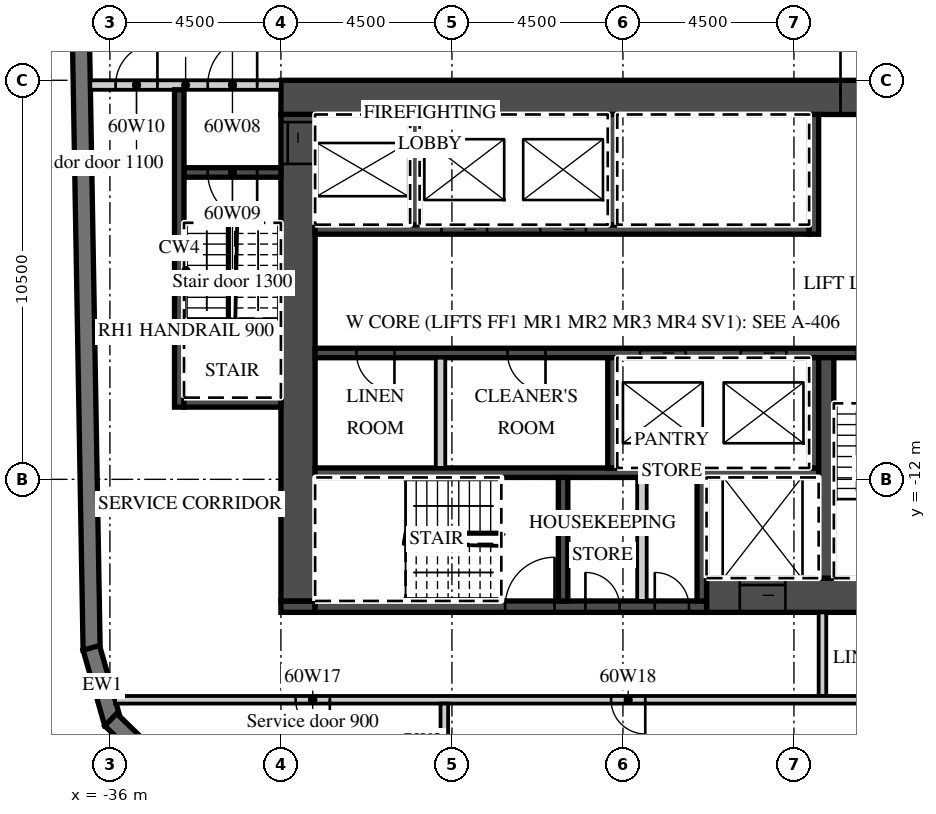
"""IFC4 building model, lengths in metres.
Left out: names, types, materials, properties, quantities, classifications, styles, units other than length and angle.
Written with IfcOpenShell. Run it as: python <this file> out.ifc"""

import sys

from ifc_helpers import new_model, si_unit, direction, frame, frame_2d, origin, place, context, subcontext, project, spatial, polyline, rectangle, outline, extrude, element, fill, save


model = new_model("IFC4")
c1 = context("Model", 3, precision=1e-05, world=origin(), true_north=direction((0.0, 1.0)))
c2 = subcontext(c1, "Body", "Model", "MODEL_VIEW")
j1 = project(units=[si_unit("LENGTHUNIT", "METRE"), si_unit("PLANEANGLEUNIT", "RADIAN")], contexts=[c1])
p1 = place(None, origin())
s1 = spatial("IfcSite", under=j1, at=p1, CompositionType="ELEMENT")
p2 = place(p1, origin())
s2 = spatial("IfcBuilding", under=s1, at=p2, CompositionType="ELEMENT")
p3 = place(p2, frame((0.0, 0.0, 244.1)))
s3 = spatial("IfcBuildingStorey", under=s2, at=p3, CompositionType="ELEMENT", Elevation=244.1)
p4 = place(p3, frame((-37.057, 16.503, 0.0), z_axis=(0.0, 0.0, 1.0), x_axis=(0.017452279857, -0.999847697366, 0.0)))
e1 = element("IfcWall", 1, at=p4, inside=s3, PredefinedType="SOLIDWALL", context=c2, shape_type="SweptSolid", body=[
    extrude(rectangle(XDim=33.0, YDim=0.45, at=frame_2d((16.5, 0.0))), origin(), (0.0, 0.0, 1.0), 3.02),
])
p5 = place(p3, frame((-36.49, -16.434, 0.0), z_axis=(0.0, 0.0, 1.0), x_axis=(0.275577603096, -0.961278827745, 0.0)))
e2 = element("IfcWall", 2, at=p5, inside=s3, PredefinedType="SOLIDWALL", context=c2, shape_type="SweptSolid", body=[
    extrude(outline(polyline([(0.0, -0.225), (2.071, -0.225), (1.95, 0.225), (0.121, 0.225), (0.0, -0.225)])), origin(), (0.0, 0.0, 1.0), 3.02),
])
p6 = place(p3, frame((-35.979, -18.324, 0.0), z_axis=(0.0, 0.0, 1.0), x_axis=(0.719320193998, -0.694678672846, 0.0)))
e3 = element("IfcWall", 3, at=p6, inside=s3, PredefinedType="SOLIDWALL", context=c2, shape_type="SweptSolid", body=[
    extrude(outline(polyline([(0.0, -0.225), (2.071, -0.225), (1.95, 0.225), (0.121, 0.225), (0.0, -0.225)])), origin(), (0.0, 0.0, 1.0), 3.02),
])
p7 = place(p3, frame((-31.5, -1.95, 0.0), z_axis=(0.0, 0.0, 1.0), x_axis=(1.0, 0.0, 0.0)))
e4 = element("IfcWall", 4, at=p7, inside=s3, PredefinedType="SHEAR", context=c2, shape_type="SweptSolid", body=[
    extrude(rectangle(XDim=18.0, YDim=0.9, at=frame_2d((9.0, 0.0))), origin(), (0.0, 0.0, 1.0), 3.02),
])
p8 = place(p7, frame((14.725, 0.0, 0.0)))
e5 = element("IfcOpeningElement", 5, at=p8, cuts=e4, PredefinedType="OPENING", context=c2, shape_type="SweptSolid", body=[
    extrude(rectangle(XDim=1.8, YDim=2.1, at=frame_2d((0.9, 1.05))), frame((0.0, 0.46, 0.0), z_axis=(0.0, -1.0, 0.0), x_axis=(1.0, 0.0, 0.0)), (0.0, 0.0, 1.0), 0.92),
])
p9 = place(p3, frame((-20.3, -15.05, 0.0), z_axis=(0.0, 0.0, 1.0), x_axis=(1.0, 0.0, 0.0)))
e6 = element("IfcWall", 6, at=p9, inside=s3, PredefinedType="SHEAR", context=c2, shape_type="SweptSolid", body=[
    extrude(rectangle(XDim=6.8, YDim=0.9, at=frame_2d((3.4, 0.0))), origin(), (0.0, 0.0, 1.0), 3.02),
])
p10 = place(p9, frame((0.875, 0.0, 0.0)))
e7 = element("IfcOpeningElement", 7, at=p10, cuts=e6, PredefinedType="OPENING", context=c2, shape_type="SweptSolid", body=[
    extrude(rectangle(XDim=1.2, YDim=2.1, at=frame_2d((0.6, 1.05))), frame((0.0, 0.46, 0.0), z_axis=(0.0, -1.0, 0.0), x_axis=(1.0, 0.0, 0.0)), (0.0, 0.0, 1.0), 0.92),
])
p11 = place(p3, frame((-31.5, -15.35, 0.0), z_axis=(0.0, 0.0, 1.0), x_axis=(1.0, 0.0, 0.0)))
e8 = element("IfcWall", 8, at=p11, inside=s3, PredefinedType="SHEAR", context=c2, shape_type="SweptSolid", body=[
    extrude(rectangle(XDim=0.9, YDim=0.3, at=frame_2d((0.45, 0.0))), origin(), (0.0, 0.0, 1.0), 3.02),
])
p12 = place(p3, frame((-30.6, -15.35, 0.0), z_axis=(0.0, 0.0, 1.0), x_axis=(1.0, 0.0, 0.0)))
e9 = element("IfcWall", 9, at=p12, inside=s3, PredefinedType="SHEAR", context=c2, shape_type="SweptSolid", body=[
    extrude(rectangle(XDim=10.3, YDim=0.3, at=frame_2d((5.15, 0.0))), origin(), (0.0, 0.0, 1.0), 3.02),
])
p13 = place(p12, frame((5.0, 0.0, 0.0)))
e10 = element("IfcOpeningElement", 10, at=p13, cuts=e9, PredefinedType="OPENING", context=c2, shape_type="SweptSolid", body=[
    extrude(rectangle(XDim=1.3, YDim=2.1, at=frame_2d((0.65, 1.05))), frame((0.0, 0.16, 0.0), z_axis=(0.0, -1.0, 0.0), x_axis=(1.0, 0.0, 0.0)), (0.0, 0.0, 1.0), 0.32),
])
p14 = place(p12, frame((7.113, 0.0, 0.0)))
e11 = element("IfcOpeningElement", 11, at=p14, cuts=e9, PredefinedType="OPENING", context=c2, shape_type="SweptSolid", body=[
    extrude(rectangle(XDim=0.9, YDim=2.1, at=frame_2d((0.45, 1.05))), frame((0.0, 0.16, 0.0), z_axis=(0.0, -1.0, 0.0), x_axis=(1.0, 0.0, 0.0)), (0.0, 0.0, 1.0), 0.32),
])
p15 = place(p12, frame((8.938, 0.0, 0.0)))
e12 = element("IfcOpeningElement", 12, at=p15, cuts=e9, PredefinedType="OPENING", context=c2, shape_type="SweptSolid", body=[
    extrude(rectangle(XDim=0.9, YDim=2.1, at=frame_2d((0.45, 1.05))), frame((0.0, 0.16, 0.0), z_axis=(0.0, -1.0, 0.0), x_axis=(1.0, 0.0, 0.0)), (0.0, 0.0, 1.0), 0.32),
])
p16 = place(p3, frame((-31.05, -15.2, 0.0), z_axis=(0.0, 0.0, 1.0), x_axis=(0.0, 1.0, 0.0)))
e13 = element("IfcWall", 13, at=p16, inside=s3, PredefinedType="SHEAR", context=c2, shape_type="SweptSolid", body=[
    extrude(rectangle(XDim=12.8, YDim=0.9, at=frame_2d((6.4, 0.0))), origin(), (0.0, 0.0, 1.0), 3.02),
])
p17 = place(p16, frame((11.5, 0.0, 0.0)))
e14 = element("IfcOpeningElement", 14, at=p17, cuts=e13, PredefinedType="OPENING", context=c2, shape_type="SweptSolid", body=[
    extrude(rectangle(XDim=1.1, YDim=2.1, at=frame_2d((0.55, 1.05))), frame((0.0, 0.46, 0.0), z_axis=(0.0, -1.0, 0.0), x_axis=(1.0, 0.0, 0.0)), (0.0, 0.0, 1.0), 0.92),
])
p18 = place(p3, frame((-30.6, -5.425, 0.0), z_axis=(0.0, 0.0, 1.0), x_axis=(1.0, 0.0, 0.0)))
e15 = element("IfcWall", 15, at=p18, inside=s3, PredefinedType="SHEAR", context=c2, shape_type="SweptSolid", body=[
    extrude(rectangle(XDim=13.0, YDim=0.25, at=frame_2d((6.5, 0.0))), origin(), (0.0, 0.0, 1.0), 3.02),
])
p19 = place(p18, frame((3.325, 0.0, 0.0)))
e16 = element("IfcOpeningElement", 16, at=p19, cuts=e15, PredefinedType="OPENING", context=c2, shape_type="SweptSolid", body=[
    extrude(rectangle(XDim=1.2, YDim=2.1, at=frame_2d((0.6, 1.05))), frame((0.0, 0.135, 0.0), z_axis=(0.0, -1.0, 0.0), x_axis=(1.0, 0.0, 0.0)), (0.0, 0.0, 1.0), 0.27),
])
p20 = place(p18, frame((5.925, 0.0, 0.0)))
e17 = element("IfcOpeningElement", 17, at=p20, cuts=e15, PredefinedType="OPENING", context=c2, shape_type="SweptSolid", body=[
    extrude(rectangle(XDim=1.2, YDim=2.1, at=frame_2d((0.6, 1.05))), frame((0.0, 0.135, 0.0), z_axis=(0.0, -1.0, 0.0), x_axis=(1.0, 0.0, 0.0)), (0.0, 0.0, 1.0), 0.27),
])
p21 = place(p3, frame((-17.475, -5.55, 0.0), z_axis=(0.0, 0.0, 1.0), x_axis=(0.0, 1.0, 0.0)))
e18 = element("IfcWall", 18, at=p21, inside=s3, PredefinedType="SHEAR", context=c2, shape_type="SweptSolid", body=[
    extrude(rectangle(XDim=3.15, YDim=0.25, at=frame_2d((1.575, 0.0))), origin(), (0.0, 0.0, 1.0), 3.02),
])
for number, where, z_axis, x_axis in (
    (19, (-27.975, -5.3, 0.0), (0.0, 0.0, 1.0), (0.0, 1.0, 0.0)),
    (20, (-22.775, -5.3, 0.0), (0.0, 0.0, 1.0), (0.0, 1.0, 0.0)),
):
    element("IfcWall", number, at=place(p3, frame(where, z_axis=z_axis, x_axis=x_axis)), inside=s3, PredefinedType="SHEAR", context=c2, shape_type="SweptSolid", body=[
        extrude(rectangle(XDim=2.9, YDim=0.25, at=frame_2d((1.45, 0.0))), origin(), (0.0, 0.0, 1.0), 3.02),
    ])
p22 = place(p3, frame((-30.6, -8.675, 0.0), z_axis=(0.0, 0.0, 1.0), x_axis=(1.0, 0.0, 0.0)))
e21 = element("IfcWall", 21, at=p22, inside=s3, PredefinedType="SHEAR", context=c2, shape_type="SweptSolid", body=[
    extrude(rectangle(XDim=16.2, YDim=0.25, at=frame_2d((8.1, 0.0))), origin(), (0.0, 0.0, 1.0), 3.02),
])
p23 = place(p22, frame((8.55, 0.0, 0.0)))
e22 = element("IfcOpeningElement", 22, at=p23, cuts=e21, PredefinedType="OPENING", context=c2, shape_type="SweptSolid", body=[
    extrude(rectangle(XDim=1.2, YDim=2.1, at=frame_2d((0.6, 1.05))), frame((0.0, 0.135, 0.0), z_axis=(0.0, -1.0, 0.0), x_axis=(1.0, 0.0, 0.0)), (0.0, 0.0, 1.0), 0.27),
])
p24 = place(p22, frame((11.2, 0.0, 0.0)))
e23 = element("IfcOpeningElement", 23, at=p24, cuts=e21, PredefinedType="OPENING", context=c2, shape_type="SweptSolid", body=[
    extrude(rectangle(XDim=1.2, YDim=2.1, at=frame_2d((0.6, 1.05))), frame((0.0, 0.135, 0.0), z_axis=(0.0, -1.0, 0.0), x_axis=(1.0, 0.0, 0.0)), (0.0, 0.0, 1.0), 0.27),
])
p25 = place(p22, frame((14.25, 0.0, 0.0)))
e24 = element("IfcOpeningElement", 24, at=p25, cuts=e21, PredefinedType="OPENING", context=c2, shape_type="SweptSolid", body=[
    extrude(rectangle(XDim=1.3, YDim=2.1, at=frame_2d((0.65, 1.05))), frame((0.0, 0.135, 0.0), z_axis=(0.0, -1.0, 0.0), x_axis=(1.0, 0.0, 0.0)), (0.0, 0.0, 1.0), 0.27),
])
p26 = place(p22, frame((1.087, 0.0, 0.0)))
e25 = element("IfcOpeningElement", 25, at=p26, cuts=e21, PredefinedType="OPENING", context=c2, shape_type="SweptSolid", body=[
    extrude(rectangle(XDim=1.0, YDim=2.1, at=frame_2d((0.5, 1.05))), frame((0.0, 0.135, 0.0), z_axis=(0.0, -1.0, 0.0), x_axis=(1.0, 0.0, 0.0)), (0.0, 0.0, 1.0), 0.27),
])
p27 = place(p22, frame((5.062, 0.0, 0.0)))
e26 = element("IfcOpeningElement", 26, at=p27, cuts=e21, PredefinedType="OPENING", context=c2, shape_type="SweptSolid", body=[
    extrude(rectangle(XDim=1.0, YDim=2.1, at=frame_2d((0.5, 1.05))), frame((0.0, 0.135, 0.0), z_axis=(0.0, -1.0, 0.0), x_axis=(1.0, 0.0, 0.0)), (0.0, 0.0, 1.0), 0.27),
])
p28 = place(p3, frame((-30.6, -11.825, 0.0), z_axis=(0.0, 0.0, 1.0), x_axis=(1.0, 0.0, 0.0)))
e27 = element("IfcWall", 27, at=p28, inside=s3, PredefinedType="SHEAR", context=c2, shape_type="SweptSolid", body=[
    extrude(rectangle(XDim=13.25, YDim=0.25, at=frame_2d((6.625, 0.0))), origin(), (0.0, 0.0, 1.0), 3.02),
])
for number, where, z_axis, x_axis in (
    (28, (-17.475, -11.7, 0.0), (0.0, 0.0, 1.0), (0.0, 1.0, 0.0)),
    (29, (-22.775, -11.7, 0.0), (0.0, 0.0, 1.0), (0.0, 1.0, 0.0)),
):
    element("IfcWall", number, at=place(p3, frame(where, z_axis=z_axis, x_axis=x_axis)), inside=s3, PredefinedType="SHEAR", context=c2, shape_type="SweptSolid", body=[
        extrude(rectangle(XDim=2.9, YDim=0.25, at=frame_2d((1.45, 0.0))), origin(), (0.0, 0.0, 1.0), 3.02),
    ])
p29 = place(p3, frame((-27.3, -11.7, 0.0), z_axis=(0.0, 0.0, 1.0), x_axis=(0.0, 1.0, 0.0)))
e30 = element("IfcWall", 30, at=p29, inside=s3, PredefinedType="PARTITIONING", context=c2, shape_type="SweptSolid", body=[
    extrude(rectangle(XDim=2.9, YDim=0.25, at=frame_2d((1.45, 0.0))), origin(), (0.0, 0.0, 1.0), 3.02),
])
p30 = place(p3, frame((-17.15, -14.6, 0.0), z_axis=(0.0, 0.0, 1.0), x_axis=(0.0, 1.0, 0.0)))
e31 = element("IfcWall", 31, at=p30, inside=s3, PredefinedType="SHEAR", context=c2, shape_type="SweptSolid", body=[
    extrude(rectangle(XDim=5.8, YDim=0.4, at=frame_2d((2.9, 0.0))), origin(), (0.0, 0.0, 1.0), 3.02),
])
for number, where, z_axis, x_axis in (
    (32, (-20.425, -15.2, 0.0), (0.0, 0.0, 1.0), (0.0, 1.0, 0.0)),
    (33, (-24.075, -15.2, 0.0), (0.0, 0.0, 1.0), (0.0, 1.0, 0.0)),
):
    element("IfcWall", number, at=place(p3, frame(where, z_axis=z_axis, x_axis=x_axis)), inside=s3, PredefinedType="SHEAR", context=c2, shape_type="SweptSolid", body=[
        extrude(rectangle(XDim=3.25, YDim=0.25, at=frame_2d((1.625, 0.0))), origin(), (0.0, 0.0, 1.0), 3.02),
    ])
p31 = place(p3, frame((-22.0, -15.2, 0.0), z_axis=(0.0, 0.0, 1.0), x_axis=(0.0, 1.0, 0.0)))
e34 = element("IfcWall", 34, at=p31, inside=s3, PredefinedType="PARTITIONING", context=c2, shape_type="SweptSolid", body=[
    extrude(rectangle(XDim=3.25, YDim=0.25, at=frame_2d((1.625, 0.0))), origin(), (0.0, 0.0, 1.0), 3.02),
])
p32 = place(p3, frame((-36.515, -1.625, 0.0), z_axis=(0.0, 0.0, 1.0), x_axis=(1.0, 0.0, 0.0)))
e35 = element("IfcWall", 35, at=p32, inside=s3, PredefinedType="PARTITIONING", context=c2, shape_type="SweptSolid", body=[
    extrude(rectangle(XDim=5.015, YDim=0.25, at=frame_2d((2.508, 0.0))), origin(), (0.0, 0.0, 1.0), 3.02),
])
p33 = place(p32, frame((3.09, 0.0, 0.0)))
e36 = element("IfcOpeningElement", 36, at=p33, cuts=e35, PredefinedType="OPENING", context=c2, shape_type="SweptSolid", body=[
    extrude(rectangle(XDim=1.3, YDim=2.1, at=frame_2d((0.65, 1.05))), frame((0.0, 0.135, 0.0), z_axis=(0.0, -1.0, 0.0), x_axis=(1.0, 0.0, 0.0)), (0.0, 0.0, 1.0), 0.27),
])
p34 = place(p32, frame((0.665, 0.0, 0.0)))
e37 = element("IfcOpeningElement", 37, at=p34, cuts=e35, PredefinedType="OPENING", context=c2, shape_type="SweptSolid", body=[
    extrude(rectangle(XDim=1.1, YDim=2.1, at=frame_2d((0.55, 1.05))), frame((0.0, 0.135, 0.0), z_axis=(0.0, -1.0, 0.0), x_axis=(1.0, 0.0, 0.0)), (0.0, 0.0, 1.0), 0.27),
])
p35 = place(p3, frame((-34.05, -3.925, 0.0), z_axis=(0.0, 0.0, 1.0), x_axis=(1.0, 0.0, 0.0)))
e38 = element("IfcWall", 38, at=p35, inside=s3, PredefinedType="SHEAR", context=c2, shape_type="SweptSolid", body=[
    extrude(rectangle(XDim=2.55, YDim=0.25, at=frame_2d((1.275, 0.0))), origin(), (0.0, 0.0, 1.0), 3.02),
])
p36 = place(p35, frame((0.625, 0.0, 0.0)))
e39 = element("IfcOpeningElement", 39, at=p36, cuts=e38, PredefinedType="OPENING", context=c2, shape_type="SweptSolid", body=[
    extrude(rectangle(XDim=1.3, YDim=2.1, at=frame_2d((0.65, 1.05))), frame((0.0, 0.135, 0.0), z_axis=(0.0, -1.0, 0.0), x_axis=(1.0, 0.0, 0.0)), (0.0, 0.0, 1.0), 0.27),
])
p37 = place(p3, frame((-34.175, -10.1, 0.0), z_axis=(0.0, 0.0, 1.0), x_axis=(0.0, 1.0, 0.0)))
e40 = element("IfcWall", 40, at=p37, inside=s3, PredefinedType="SHEAR", context=c2, shape_type="SweptSolid", body=[
    extrude(rectangle(XDim=8.35, YDim=0.25, at=frame_2d((4.175, 0.0))), origin(), (0.0, 0.0, 1.0), 3.02),
])
p38 = place(p3, frame((-34.05, -9.975, 0.0), z_axis=(0.0, 0.0, 1.0), x_axis=(1.0, 0.0, 0.0)))
e41 = element("IfcWall", 41, at=p38, inside=s3, PredefinedType="SHEAR", context=c2, shape_type="SweptSolid", body=[
    extrude(rectangle(XDim=2.55, YDim=0.25, at=frame_2d((1.275, 0.0))), origin(), (0.0, 0.0, 1.0), 3.02),
])
p39 = place(p3, frame((-17.25, -17.7, 0.0), z_axis=(0.0, 0.0, 1.0), x_axis=(0.0, 1.0, 0.0)))
e42 = element("IfcWall", 42, at=p39, inside=s3, PredefinedType="PARTITIONING", context=c2, shape_type="SweptSolid", body=[
    extrude(rectangle(XDim=2.2, YDim=0.2, at=frame_2d((1.1, 0.0))), origin(), (0.0, 0.0, 1.0), 3.02),
])
p40 = place(p3, frame((-35.864, -17.8, 0.0), z_axis=(0.0, 0.0, 1.0), x_axis=(1.0, 0.0, 0.0)))
e43 = element("IfcWall", 43, at=p40, inside=s3, PredefinedType="PARTITIONING", context=c2, shape_type="SweptSolid", body=[
    extrude(rectangle(XDim=22.264, YDim=0.2, at=frame_2d((11.132, 0.0))), origin(), (0.0, 0.0, 1.0), 3.02),
])
p41 = place(p40, frame((4.751, 0.0, 0.0)))
e44 = element("IfcOpeningElement", 44, at=p41, cuts=e43, PredefinedType="OPENING", context=c2, shape_type="SweptSolid", body=[
    extrude(rectangle(XDim=0.9, YDim=2.1, at=frame_2d((0.45, 1.05))), frame((0.0, 0.11, 0.0), z_axis=(0.0, -1.0, 0.0), x_axis=(1.0, 0.0, 0.0)), (0.0, 0.0, 1.0), 0.22),
])
p42 = place(p40, frame((13.051, 0.0, 0.0)))
e45 = element("IfcOpeningElement", 45, at=p42, cuts=e43, PredefinedType="OPENING", context=c2, shape_type="SweptSolid", body=[
    extrude(rectangle(XDim=0.9, YDim=2.1, at=frame_2d((0.45, 1.05))), frame((0.0, 0.11, 0.0), z_axis=(0.0, -1.0, 0.0), x_axis=(1.0, 0.0, 0.0)), (0.0, 0.0, 1.0), 0.22),
])
p43 = place(p3, frame((-27.2, -19.88, 0.0), z_axis=(0.0, 0.0, 1.0), x_axis=(0.0, 1.0, 0.0)))
e46 = element("IfcWall", 46, at=p43, inside=s3, PredefinedType="PARTITIONING", context=c2, shape_type="SweptSolid", body=[
    extrude(rectangle(XDim=1.98, YDim=0.2, at=frame_2d((0.99, 0.0))), origin(), (0.0, 0.0, 1.0), 3.02),
])
p44 = place(p23, origin())
e47 = element("IfcDoor", 47, at=p44, inside=s3, OperationType="SLIDING_TO_LEFT", PredefinedType="DOOR", context=c2, shape_type="SweptSolid", body=[
    extrude(rectangle(XDim=1.2, YDim=2.1, at=frame_2d((0.6, 1.05))), frame((0.0, 0.025, 0.0), z_axis=(0.0, -1.0, 0.0), x_axis=(1.0, 0.0, 0.0)), (0.0, 0.0, 1.0), 0.05),
])
fill(e22, e47)
p45 = place(p24, origin())
e48 = element("IfcDoor", 48, at=p45, inside=s3, OperationType="SLIDING_TO_RIGHT", PredefinedType="DOOR", context=c2, shape_type="SweptSolid", body=[
    extrude(rectangle(XDim=1.2, YDim=2.1, at=frame_2d((0.6, 1.05))), frame((0.0, 0.025, 0.0), z_axis=(0.0, -1.0, 0.0), x_axis=(1.0, 0.0, 0.0)), (0.0, 0.0, 1.0), 0.05),
])
fill(e23, e48)
p46 = place(p19, origin())
e49 = element("IfcDoor", 49, at=p46, inside=s3, OperationType="SLIDING_TO_RIGHT", PredefinedType="DOOR", context=c2, shape_type="SweptSolid", body=[
    extrude(rectangle(XDim=1.2, YDim=2.1, at=frame_2d((0.6, 1.05))), frame((0.0, 0.025, 0.0), z_axis=(0.0, -1.0, 0.0), x_axis=(1.0, 0.0, 0.0)), (0.0, 0.0, 1.0), 0.05),
])
fill(e16, e49)
p47 = place(p20, origin())
e50 = element("IfcDoor", 50, at=p47, inside=s3, OperationType="SLIDING_TO_RIGHT", PredefinedType="DOOR", context=c2, shape_type="SweptSolid", body=[
    extrude(rectangle(XDim=1.2, YDim=2.1, at=frame_2d((0.6, 1.05))), frame((0.0, 0.025, 0.0), z_axis=(0.0, -1.0, 0.0), x_axis=(1.0, 0.0, 0.0)), (0.0, 0.0, 1.0), 0.05),
])
fill(e17, e50)
p48 = place(p10, origin())
e51 = element("IfcDoor", 51, at=p48, inside=s3, OperationType="SLIDING_TO_LEFT", PredefinedType="DOOR", context=c2, shape_type="SweptSolid", body=[
    extrude(rectangle(XDim=1.2, YDim=2.1, at=frame_2d((0.6, 1.05))), frame((0.0, 0.025, 0.0), z_axis=(0.0, -1.0, 0.0), x_axis=(1.0, 0.0, 0.0)), (0.0, 0.0, 1.0), 0.05),
])
fill(e7, e51)
p49 = place(p17, origin())
e52 = element("IfcDoor", 52, at=p49, inside=s3, OperationType="SLIDING_TO_RIGHT", PredefinedType="DOOR", context=c2, shape_type="SweptSolid", body=[
    extrude(rectangle(XDim=1.1, YDim=2.1, at=frame_2d((0.55, 1.05))), frame((0.0, 0.025, 0.0), z_axis=(0.0, -1.0, 0.0), x_axis=(1.0, 0.0, 0.0)), (0.0, 0.0, 1.0), 0.05),
])
fill(e14, e52)
p50 = place(p8, origin())
e53 = element("IfcDoor", 53, at=p50, inside=s3, OperationType="DOUBLE_DOOR_DOUBLE_SWING", PredefinedType="DOOR", context=c2, shape_type="SweptSolid", body=[
    extrude(rectangle(XDim=1.8, YDim=2.1, at=frame_2d((0.9, 1.05))), frame((0.0, 0.025, 0.0), z_axis=(0.0, -1.0, 0.0), x_axis=(1.0, 0.0, 0.0)), (0.0, 0.0, 1.0), 0.05),
])
fill(e5, e53)
p51 = place(p33, origin())
e54 = element("IfcDoor", 54, at=p51, inside=s3, OperationType="SINGLE_SWING_RIGHT", PredefinedType="DOOR", context=c2, shape_type="SweptSolid", body=[
    extrude(rectangle(XDim=1.3, YDim=2.1, at=frame_2d((0.65, 1.05))), frame((0.0, 0.025, 0.0), z_axis=(0.0, -1.0, 0.0), x_axis=(1.0, 0.0, 0.0)), (0.0, 0.0, 1.0), 0.05),
])
fill(e36, e54)
p52 = place(p36, origin())
e55 = element("IfcDoor", 55, at=p52, inside=s3, OperationType="SINGLE_SWING_RIGHT", PredefinedType="DOOR", context=c2, shape_type="SweptSolid", body=[
    extrude(rectangle(XDim=1.3, YDim=2.1, at=frame_2d((0.65, 1.05))), frame((0.0, 0.025, 0.0), z_axis=(0.0, -1.0, 0.0), x_axis=(1.0, 0.0, 0.0)), (0.0, 0.0, 1.0), 0.05),
])
fill(e39, e55)
p53 = place(p34, origin())
e56 = element("IfcDoor", 56, at=p53, inside=s3, OperationType="SINGLE_SWING_RIGHT", PredefinedType="DOOR", context=c2, shape_type="SweptSolid", body=[
    extrude(rectangle(XDim=1.1, YDim=2.1, at=frame_2d((0.55, 1.05))), frame((0.0, 0.025, 0.0), z_axis=(0.0, -1.0, 0.0), x_axis=(1.0, 0.0, 0.0)), (0.0, 0.0, 1.0), 0.05),
])
fill(e37, e56)
p54 = place(p25, origin())
e57 = element("IfcDoor", 57, at=p54, inside=s3, OperationType="SINGLE_SWING_RIGHT", PredefinedType="DOOR", context=c2, shape_type="SweptSolid", body=[
    extrude(rectangle(XDim=1.3, YDim=2.1, at=frame_2d((0.65, 1.05))), frame((0.0, 0.025, 0.0), z_axis=(0.0, -1.0, 0.0), x_axis=(1.0, 0.0, 0.0)), (0.0, 0.0, 1.0), 0.05),
])
fill(e24, e57)
p55 = place(p13, origin())
e58 = element("IfcDoor", 58, at=p55, inside=s3, OperationType="SINGLE_SWING_RIGHT", PredefinedType="DOOR", context=c2, shape_type="SweptSolid", body=[
    extrude(rectangle(XDim=1.3, YDim=2.1, at=frame_2d((0.65, 1.05))), frame((0.0, 0.025, 0.0), z_axis=(0.0, -1.0, 0.0), x_axis=(1.0, 0.0, 0.0)), (0.0, 0.0, 1.0), 0.05),
])
fill(e10, e58)
p56 = place(p14, origin())
e59 = element("IfcDoor", 59, at=p56, inside=s3, OperationType="SINGLE_SWING_LEFT", PredefinedType="DOOR", context=c2, shape_type="SweptSolid", body=[
    extrude(rectangle(XDim=0.9, YDim=2.1, at=frame_2d((0.45, 1.05))), frame((0.0, 0.025, 0.0), z_axis=(0.0, -1.0, 0.0), x_axis=(1.0, 0.0, 0.0)), (0.0, 0.0, 1.0), 0.05),
])
fill(e11, e59)
p57 = place(p15, origin())
e60 = element("IfcDoor", 60, at=p57, inside=s3, OperationType="SINGLE_SWING_LEFT", PredefinedType="DOOR", context=c2, shape_type="SweptSolid", body=[
    extrude(rectangle(XDim=0.9, YDim=2.1, at=frame_2d((0.45, 1.05))), frame((0.0, 0.025, 0.0), z_axis=(0.0, -1.0, 0.0), x_axis=(1.0, 0.0, 0.0)), (0.0, 0.0, 1.0), 0.05),
])
fill(e12, e60)
p58 = place(p26, origin())
e61 = element("IfcDoor", 61, at=p58, inside=s3, OperationType="SINGLE_SWING_RIGHT", PredefinedType="DOOR", context=c2, shape_type="SweptSolid", body=[
    extrude(rectangle(XDim=1.0, YDim=2.1, at=frame_2d((0.5, 1.05))), frame((0.0, 0.025, 0.0), z_axis=(0.0, -1.0, 0.0), x_axis=(1.0, 0.0, 0.0)), (0.0, 0.0, 1.0), 0.05),
])
fill(e25, e61)
p59 = place(p27, origin())
e62 = element("IfcDoor", 62, at=p59, inside=s3, OperationType="SINGLE_SWING_RIGHT", PredefinedType="DOOR", context=c2, shape_type="SweptSolid", body=[
    extrude(rectangle(XDim=1.0, YDim=2.1, at=frame_2d((0.5, 1.05))), frame((0.0, 0.025, 0.0), z_axis=(0.0, -1.0, 0.0), x_axis=(1.0, 0.0, 0.0)), (0.0, 0.0, 1.0), 0.05),
])
fill(e26, e62)
p60 = place(p41, origin())
e63 = element("IfcDoor", 63, at=p60, inside=s3, OperationType="SINGLE_SWING_RIGHT", PredefinedType="DOOR", context=c2, shape_type="SweptSolid", body=[
    extrude(rectangle(XDim=0.9, YDim=2.1, at=frame_2d((0.45, 1.05))), frame((0.0, 0.025, 0.0), z_axis=(0.0, -1.0, 0.0), x_axis=(1.0, 0.0, 0.0)), (0.0, 0.0, 1.0), 0.05),
])
fill(e44, e63)
p61 = place(p42, origin())
e64 = element("IfcDoor", 64, at=p61, inside=s3, OperationType="SINGLE_SWING_RIGHT", PredefinedType="DOOR", context=c2, shape_type="SweptSolid", body=[
    extrude(rectangle(XDim=0.9, YDim=2.1, at=frame_2d((0.45, 1.05))), frame((0.0, 0.025, 0.0), z_axis=(0.0, -1.0, 0.0), x_axis=(1.0, 0.0, 0.0)), (0.0, 0.0, 1.0), 0.05),
])
fill(e45, e64)
save(model, sys.argv[1])
